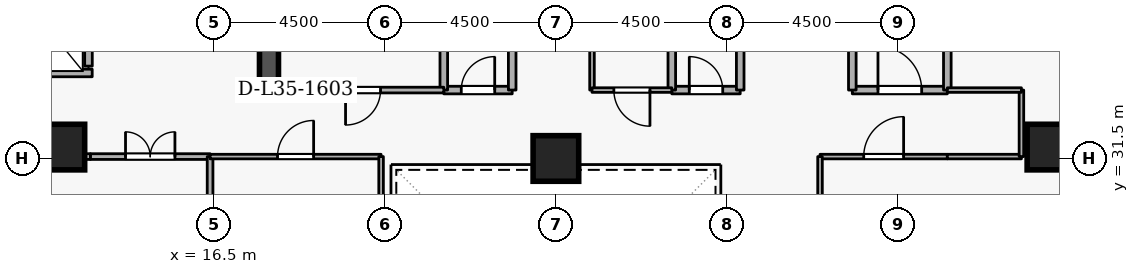
"""IFC4 building model, lengths in metres.
Left out: names, types, materials, properties, quantities, classifications, styles, units other than length and angle.
Written with IfcOpenShell. Run it as: python <this file> out.ifc"""

import sys

from ifc_helpers import new_model, si_unit, direction, frame, frame_2d, origin, origin_2d, place, context, subcontext, project, spatial, rectangle, extrude, element, fill, save


model = new_model("IFC4")
c1 = context("Model", 3, precision=1e-05, world=origin(), true_north=direction((0.0, 1.0)))
c2 = subcontext(c1, "Body", "Model", "MODEL_VIEW")
j1 = project(units=[si_unit("LENGTHUNIT", "METRE"), si_unit("PLANEANGLEUNIT", "RADIAN")], contexts=[c1])
p1 = place(None, origin())
s1 = spatial("IfcSite", under=j1, at=p1, CompositionType="ELEMENT")
p2 = place(p1, origin())
s2 = spatial("IfcBuilding", under=s1, at=p2, CompositionType="ELEMENT")
p3 = place(p2, frame((0.0, 0.0, 134.1)))
s3 = spatial("IfcBuildingStorey", under=s2, at=p3, CompositionType="ELEMENT", Elevation=134.1)
p4 = place(p3, frame((17.95, 33.1, 0.0), z_axis=(0.0, 0.0, 1.0), x_axis=(0.0, 1.0, 0.0)))
e1 = element("IfcWall", 1, at=p4, inside=s3, PredefinedType="SHEAR", context=c2, shape_type="SweptSolid", body=[
    extrude(rectangle(XDim=5.8, YDim=0.5, at=frame_2d((2.9, 0.0))), origin(), (0.0, 0.0, 1.0), 3.6),
])
for number, where, z_axis, x_axis in (
    (2, (12.5, 31.8, 0.0), (0.0, 0.0, 1.0), (1.0, 0.0, 0.0)),
    (3, (38.5, 31.8, 0.0), (0.0, 0.0, 1.0), (1.0, 0.0, 0.0)),
    (4, (25.5, 31.5, 0.0), (0.0, 0.0, 1.0), (1.0, 0.0, 0.0)),
):
    element("IfcColumn", number, at=place(p3, frame(where, z_axis=z_axis, x_axis=x_axis)), inside=s3, PredefinedType="COLUMN", context=c2, shape_type="SweptSolid", body=[
        extrude(rectangle(XDim=1.2, YDim=1.2, at=origin_2d()), origin(), (0.0, 0.0, 1.0), 3.6),
    ])
p5 = place(p3, frame((13.2, 33.93, 0.0), z_axis=(0.0, 0.0, 1.0), x_axis=(0.0, 1.0, 0.0)))
e5 = element("IfcWall", 5, at=p5, inside=s3, PredefinedType="STANDARD", context=c2, shape_type="SweptSolid", body=[
    extrude(rectangle(XDim=1.94, YDim=0.2, at=frame_2d((0.97, 0.0))), origin(), (0.0, 0.0, 1.0), 3.34),
])
p6 = place(p5, frame((0.46, 0.0, 0.0)))
e6 = element("IfcOpeningElement", 6, at=p6, cuts=e5, PredefinedType="OPENING", context=c2, shape_type="SweptSolid", body=[
    extrude(rectangle(XDim=1.02, YDim=2.06, at=frame_2d((0.51, 1.03))), frame((0.0, 0.11, 0.0), z_axis=(0.0, -1.0, 0.0), x_axis=(1.0, 0.0, 0.0)), (0.0, 0.0, 1.0), 0.22),
])
p7 = place(p3, frame((11.002, 33.75, 0.0), z_axis=(0.0, 0.0, 1.0), x_axis=(1.0, 0.0, 0.0)))
e7 = element("IfcWall", 7, at=p7, inside=s3, PredefinedType="STANDARD", context=c2, shape_type="SweptSolid", body=[
    extrude(rectangle(XDim=2.296, YDim=0.2, at=frame_2d((1.148, 0.0))), origin(), (0.0, 0.0, 1.0), 3.34),
])
p8 = place(p3, frame((33.3, 33.3, 0.0), z_axis=(0.0, 0.0, 1.0), x_axis=(1.0, 0.0, 0.0)))
e8 = element("IfcWall", 8, at=p8, inside=s3, PredefinedType="STANDARD", context=c2, shape_type="SweptSolid", body=[
    extrude(rectangle(XDim=2.5, YDim=0.2, at=frame_2d((1.25, 0.0))), origin(), (0.0, 0.0, 1.0), 3.34),
])
p9 = place(p8, frame((0.675, 0.0, 0.0)))
e9 = element("IfcOpeningElement", 9, at=p9, cuts=e8, PredefinedType="OPENING", context=c2, shape_type="SweptSolid", body=[
    extrude(rectangle(XDim=1.15, YDim=2.1, at=frame_2d((0.575, 1.05))), frame((0.0, 0.11, 0.0), z_axis=(0.0, -1.0, 0.0), x_axis=(1.0, 0.0, 0.0)), (0.0, 0.0, 1.0), 0.22),
])
p10 = place(p3, frame((35.8, 33.3, 0.0), z_axis=(0.0, 0.0, 1.0), x_axis=(0.0, 1.0, 0.0)))
e10 = element("IfcWall", 10, at=p10, inside=s3, PredefinedType="STANDARD", context=c2, shape_type="SweptSolid", body=[
    extrude(rectangle(XDim=5.7, YDim=0.2, at=frame_2d((2.85, 0.0))), origin(), (0.0, 0.0, 1.0), 3.34),
])
p11 = place(p3, frame((33.3, 35.6, 0.0), z_axis=(0.0, 0.0, 1.0), x_axis=(0.0, -1.0, 0.0)))
e11 = element("IfcWall", 11, at=p11, inside=s3, PredefinedType="STANDARD", context=c2, shape_type="SweptSolid", body=[
    extrude(rectangle(XDim=2.3, YDim=0.2, at=frame_2d((1.15, 0.0))), origin(), (0.0, 0.0, 1.0), 2.545),
])
p12 = place(p3, frame((22.55, 33.3, 0.0), z_axis=(0.0, 0.0, 1.0), x_axis=(1.0, 0.0, 0.0)))
e12 = element("IfcWall", 12, at=p12, inside=s3, PredefinedType="STANDARD", context=c2, shape_type="SweptSolid", body=[
    extrude(rectangle(XDim=1.8, YDim=0.2, at=frame_2d((0.9, 0.0))), origin(), (0.0, 0.0, 1.0), 3.34),
])
p13 = place(p12, frame((0.46, 0.0, 0.0)))
e13 = element("IfcOpeningElement", 13, at=p13, cuts=e12, PredefinedType="OPENING", context=c2, shape_type="SweptSolid", body=[
    extrude(rectangle(XDim=0.88, YDim=2.04, at=frame_2d((0.44, 1.02))), frame((0.0, 0.11, 0.0), z_axis=(0.0, -1.0, 0.0), x_axis=(1.0, 0.0, 0.0)), (0.0, 0.0, 1.0), 0.22),
])
for number, where, z_axis, x_axis in (
    (14, (24.35, 33.3, 0.0), (0.0, 0.0, 1.0), (0.0, 1.0, 0.0)),
    (15, (22.55, 35.35, 0.0), (0.0, 0.0, 1.0), (0.0, -1.0, 0.0)),
):
    element("IfcWall", number, at=place(p3, frame(where, z_axis=z_axis, x_axis=x_axis)), inside=s3, PredefinedType="STANDARD", context=c2, shape_type="SweptSolid", body=[
        extrude(rectangle(XDim=2.05, YDim=0.2, at=frame_2d((1.025, 0.0))), origin(), (0.0, 0.0, 1.0), 3.34),
    ])
p14 = place(p3, frame((28.55, 33.3, 0.0), z_axis=(0.0, 0.0, 1.0), x_axis=(1.0, 0.0, 0.0)))
e16 = element("IfcWall", 16, at=p14, inside=s3, PredefinedType="STANDARD", context=c2, shape_type="SweptSolid", body=[
    extrude(rectangle(XDim=1.8, YDim=0.2, at=frame_2d((0.9, 0.0))), origin(), (0.0, 0.0, 1.0), 3.34),
])
p15 = place(p14, frame((0.46, 0.0, 0.0)))
e17 = element("IfcOpeningElement", 17, at=p15, cuts=e16, PredefinedType="OPENING", context=c2, shape_type="SweptSolid", body=[
    extrude(rectangle(XDim=0.88, YDim=2.04, at=frame_2d((0.44, 1.02))), frame((0.0, 0.11, 0.0), z_axis=(0.0, -1.0, 0.0), x_axis=(1.0, 0.0, 0.0)), (0.0, 0.0, 1.0), 0.22),
])
for number, where, z_axis, x_axis in (
    (18, (30.35, 33.3, 0.0), (0.0, 0.0, 1.0), (0.0, 1.0, 0.0)),
    (19, (28.55, 35.35, 0.0), (0.0, 0.0, 1.0), (0.0, -1.0, 0.0)),
):
    element("IfcWall", number, at=place(p3, frame(where, z_axis=z_axis, x_axis=x_axis)), inside=s3, PredefinedType="STANDARD", context=c2, shape_type="SweptSolid", body=[
        extrude(rectangle(XDim=2.05, YDim=0.2, at=frame_2d((1.025, 0.0))), origin(), (0.0, 0.0, 1.0), 3.34),
    ])
p16 = place(p3, frame((22.55, 33.3, 0.0), z_axis=(0.0, 0.0, 1.0), x_axis=(-1.0, 0.0, 0.0)))
e20 = element("IfcWall", 20, at=p16, inside=s3, PredefinedType="PARTITIONING", context=c2, shape_type="SweptSolid", body=[
    extrude(rectangle(XDim=4.25, YDim=0.15, at=frame_2d((2.125, 0.0))), origin(), (0.0, 0.0, 1.0), 3.34),
])
p17 = place(p16, frame((1.665, 0.0, 0.0)))
e21 = element("IfcOpeningElement", 21, at=p17, cuts=e20, PredefinedType="OPENING", context=c2, shape_type="SweptSolid", body=[
    extrude(rectangle(XDim=0.92, YDim=2.08, at=frame_2d((0.46, 1.04))), frame((0.0, 0.085, 0.0), z_axis=(0.0, -1.0, 0.0), x_axis=(1.0, 0.0, 0.0)), (0.0, 0.0, 1.0), 0.17),
])
p18 = place(p3, frame((26.45, 33.3, 0.0), z_axis=(0.0, 0.0, 1.0), x_axis=(0.0, 1.0, 0.0)))
e22 = element("IfcWall", 22, at=p18, inside=s3, PredefinedType="PARTITIONING", context=c2, shape_type="SweptSolid", body=[
    extrude(rectangle(XDim=2.05, YDim=0.12, at=frame_2d((1.025, 0.0))), origin(), (0.0, 0.0, 1.0), 3.34),
])
p19 = place(p3, frame((28.55, 33.3, 0.0), z_axis=(0.0, 0.0, 1.0), x_axis=(-1.0, 0.0, 0.0)))
e23 = element("IfcWall", 23, at=p19, inside=s3, PredefinedType="PARTITIONING", context=c2, shape_type="SweptSolid", body=[
    extrude(rectangle(XDim=2.1, YDim=0.12, at=frame_2d((1.05, 0.0))), origin(), (0.0, 0.0, 1.0), 3.34),
])
p20 = place(p19, frame((0.575, 0.0, 0.0)))
e24 = element("IfcOpeningElement", 24, at=p20, cuts=e23, PredefinedType="OPENING", context=c2, shape_type="SweptSolid", body=[
    extrude(rectangle(XDim=0.95, YDim=2.1, at=frame_2d((0.475, 1.05))), frame((0.0, 0.07, 0.0), z_axis=(0.0, -1.0, 0.0), x_axis=(1.0, 0.0, 0.0)), (0.0, 0.0, 1.0), 0.14),
])
p21 = place(p3, frame((13.25, 31.55, 0.0), z_axis=(0.0, 0.0, 1.0), x_axis=(1.0, 0.0, 0.0)))
e25 = element("IfcWall", 25, at=p21, inside=s3, PredefinedType="PARTITIONING", context=c2, shape_type="SweptSolid", body=[
    extrude(rectangle(XDim=3.15, YDim=0.15, at=frame_2d((1.575, 0.0))), origin(), (0.0, 0.0, 1.0), 3.34),
])
p22 = place(p21, frame((0.925, 0.0, 0.0)))
e26 = element("IfcOpeningElement", 26, at=p22, cuts=e25, PredefinedType="OPENING", context=c2, shape_type="SweptSolid", body=[
    extrude(rectangle(XDim=1.3, YDim=2.12, at=frame_2d((0.65, 1.06))), frame((0.0, 0.085, 0.0), z_axis=(0.0, -1.0, 0.0), x_axis=(1.0, 0.0, 0.0)), (0.0, 0.0, 1.0), 0.17),
])
p23 = place(p3, frame((16.4, 31.55, 0.0), z_axis=(0.0, 0.0, 1.0), x_axis=(0.0, -1.0, 0.0)))
e27 = element("IfcWall", 27, at=p23, inside=s3, PredefinedType="PARTITIONING", context=c2, shape_type="SweptSolid", body=[
    extrude(rectangle(XDim=4.55, YDim=0.15, at=frame_2d((2.275, 0.0))), origin(), (0.0, 0.0, 1.0), 3.34),
])
p24 = place(p3, frame((10.9, 31.55, 0.0), z_axis=(0.0, 0.0, 1.0), x_axis=(1.0, 0.0, 0.0)))
e28 = element("IfcWall", 28, at=p24, inside=s3, PredefinedType="PARTITIONING", context=c2, shape_type="SweptSolid", body=[
    extrude(rectangle(XDim=2.35, YDim=0.15, at=frame_2d((1.175, 0.0))), origin(), (0.0, 0.0, 1.0), 3.34),
])
p25 = place(p3, frame((16.4, 31.55, 0.0), z_axis=(0.0, 0.0, 1.0), x_axis=(1.0, 0.0, 0.0)))
e29 = element("IfcWall", 29, at=p25, inside=s3, PredefinedType="PARTITIONING", context=c2, shape_type="SweptSolid", body=[
    extrude(rectangle(XDim=4.5, YDim=0.12, at=frame_2d((2.25, 0.0))), origin(), (0.0, 0.0, 1.0), 3.34),
])
p26 = place(p25, frame((1.775, 0.0, 0.0)))
e30 = element("IfcOpeningElement", 30, at=p26, cuts=e29, PredefinedType="OPENING", context=c2, shape_type="SweptSolid", body=[
    extrude(rectangle(XDim=0.95, YDim=2.1, at=frame_2d((0.475, 1.05))), frame((0.0, 0.07, 0.0), z_axis=(0.0, -1.0, 0.0), x_axis=(1.0, 0.0, 0.0)), (0.0, 0.0, 1.0), 0.14),
])
p27 = place(p3, frame((20.9, 31.55, 0.0), z_axis=(0.0, 0.0, 1.0), x_axis=(0.0, -1.0, 0.0)))
e31 = element("IfcWall", 31, at=p27, inside=s3, PredefinedType="PARTITIONING", context=c2, shape_type="SweptSolid", body=[
    extrude(rectangle(XDim=9.1, YDim=0.12, at=frame_2d((4.55, 0.0))), origin(), (0.0, 0.0, 1.0), 3.34),
])
p28 = place(p3, frame((32.45, 31.55, 0.0), z_axis=(0.0, 0.0, 1.0), x_axis=(1.0, 0.0, 0.0)))
e32 = element("IfcWall", 32, at=p28, inside=s3, PredefinedType="PARTITIONING", context=c2, shape_type="SweptSolid", body=[
    extrude(rectangle(XDim=3.35, YDim=0.12, at=frame_2d((1.675, 0.0))), origin(), (0.0, 0.0, 1.0), 3.34),
])
p29 = place(p28, frame((1.15, 0.0, 0.0)))
e33 = element("IfcOpeningElement", 33, at=p29, cuts=e32, PredefinedType="OPENING", context=c2, shape_type="SweptSolid", body=[
    extrude(rectangle(XDim=1.05, YDim=2.1, at=frame_2d((0.525, 1.05))), frame((0.0, 0.07, 0.0), z_axis=(0.0, -1.0, 0.0), x_axis=(1.0, 0.0, 0.0)), (0.0, 0.0, 1.0), 0.14),
])
p30 = place(p3, frame((35.8, 31.55, 0.0), z_axis=(0.0, 0.0, 1.0), x_axis=(1.0, 0.0, 0.0)))
e34 = element("IfcWall", 34, at=p30, inside=s3, PredefinedType="PARTITIONING", context=c2, shape_type="SweptSolid", body=[
    extrude(rectangle(XDim=1.95, YDim=0.12, at=frame_2d((0.975, 0.0))), origin(), (0.0, 0.0, 1.0), 3.34),
])
p31 = place(p3, frame((37.75, 31.55, 0.0), z_axis=(0.0, 0.0, 1.0), x_axis=(0.0, 1.0, 0.0)))
e35 = element("IfcWall", 35, at=p31, inside=s3, PredefinedType="PARTITIONING", context=c2, shape_type="SweptSolid", body=[
    extrude(rectangle(XDim=1.75, YDim=0.12, at=frame_2d((0.875, 0.0))), origin(), (0.0, 0.0, 1.0), 3.34),
])
p32 = place(p3, frame((37.75, 33.3, 0.0), z_axis=(0.0, 0.0, 1.0), x_axis=(-1.0, 0.0, 0.0)))
e36 = element("IfcWall", 36, at=p32, inside=s3, PredefinedType="PARTITIONING", context=c2, shape_type="SweptSolid", body=[
    extrude(rectangle(XDim=1.95, YDim=0.12, at=frame_2d((0.975, 0.0))), origin(), (0.0, 0.0, 1.0), 3.34),
])
p33 = place(p3, frame((32.45, 29.25, 0.0), z_axis=(0.0, 0.0, 1.0), x_axis=(0.0, 1.0, 0.0)))
e37 = element("IfcWall", 37, at=p33, inside=s3, PredefinedType="PARTITIONING", context=c2, shape_type="SweptSolid", body=[
    extrude(rectangle(XDim=2.3, YDim=0.12, at=frame_2d((1.15, 0.0))), origin(), (0.0, 0.0, 1.0), 3.34),
])
p34 = place(p9, origin())
e38 = element("IfcDoor", 38, at=p34, inside=s3, OperationType="SINGLE_SWING_LEFT", PredefinedType="DOOR", context=c2, shape_type="SweptSolid", body=[
    extrude(rectangle(XDim=1.15, YDim=2.1, at=frame_2d((0.575, 1.05))), frame((0.0, 0.025, 0.0), z_axis=(0.0, -1.0, 0.0), x_axis=(1.0, 0.0, 0.0)), (0.0, 0.0, 1.0), 0.05),
])
fill(e9, e38)
p35 = place(p13, origin())
e39 = element("IfcDoor", 39, at=p35, inside=s3, OperationType="SINGLE_SWING_RIGHT", PredefinedType="DOOR", context=c2, shape_type="SweptSolid", body=[
    extrude(rectangle(XDim=0.88, YDim=2.04, at=frame_2d((0.44, 1.02))), frame((0.0, 0.025, 0.0), z_axis=(0.0, -1.0, 0.0), x_axis=(1.0, 0.0, 0.0)), (0.0, 0.0, 1.0), 0.05),
])
fill(e13, e39)
p36 = place(p15, origin())
e40 = element("IfcDoor", 40, at=p36, inside=s3, OperationType="SINGLE_SWING_LEFT", PredefinedType="DOOR", context=c2, shape_type="SweptSolid", body=[
    extrude(rectangle(XDim=0.88, YDim=2.04, at=frame_2d((0.44, 1.02))), frame((0.0, 0.025, 0.0), z_axis=(0.0, -1.0, 0.0), x_axis=(1.0, 0.0, 0.0)), (0.0, 0.0, 1.0), 0.05),
])
fill(e17, e40)
p37 = place(p17, origin())
e41 = element("IfcDoor", 41, at=p37, inside=s3, OperationType="SINGLE_SWING_RIGHT", PredefinedType="DOOR", context=c2, shape_type="SweptSolid", body=[
    extrude(rectangle(XDim=0.92, YDim=2.08, at=frame_2d((0.46, 1.04))), frame((0.0, 0.025, 0.0), z_axis=(0.0, -1.0, 0.0), x_axis=(1.0, 0.0, 0.0)), (0.0, 0.0, 1.0), 0.05),
])
fill(e21, e41)
p38 = place(p20, origin())
e42 = element("IfcDoor", 42, at=p38, inside=s3, OperationType="SINGLE_SWING_LEFT", PredefinedType="DOOR", context=c2, shape_type="SweptSolid", body=[
    extrude(rectangle(XDim=0.95, YDim=2.1, at=frame_2d((0.475, 1.05))), frame((0.0, 0.025, 0.0), z_axis=(0.0, -1.0, 0.0), x_axis=(1.0, 0.0, 0.0)), (0.0, 0.0, 1.0), 0.05),
])
fill(e24, e42)
p39 = place(p22, origin())
e43 = element("IfcDoor", 43, at=p39, inside=s3, OperationType="DOUBLE_DOOR_SINGLE_SWING", PredefinedType="DOOR", context=c2, shape_type="SweptSolid", body=[
    extrude(rectangle(XDim=1.3, YDim=2.12, at=frame_2d((0.65, 1.06))), frame((0.0, 0.025, 0.0), z_axis=(0.0, -1.0, 0.0), x_axis=(1.0, 0.0, 0.0)), (0.0, 0.0, 1.0), 0.05),
])
fill(e26, e43)
p40 = place(p26, origin())
e44 = element("IfcDoor", 44, at=p40, inside=s3, OperationType="SINGLE_SWING_RIGHT", PredefinedType="DOOR", context=c2, shape_type="SweptSolid", body=[
    extrude(rectangle(XDim=0.95, YDim=2.1, at=frame_2d((0.475, 1.05))), frame((0.0, 0.025, 0.0), z_axis=(0.0, -1.0, 0.0), x_axis=(1.0, 0.0, 0.0)), (0.0, 0.0, 1.0), 0.05),
])
fill(e30, e44)
p41 = place(p29, origin())
e45 = element("IfcDoor", 45, at=p41, inside=s3, OperationType="SINGLE_SWING_RIGHT", PredefinedType="DOOR", context=c2, shape_type="SweptSolid", body=[
    extrude(rectangle(XDim=1.05, YDim=2.1, at=frame_2d((0.525, 1.05))), frame((0.0, 0.025, 0.0), z_axis=(0.0, -1.0, 0.0), x_axis=(1.0, 0.0, 0.0)), (0.0, 0.0, 1.0), 0.05),
])
fill(e33, e45)
save(model, sys.argv[1])
